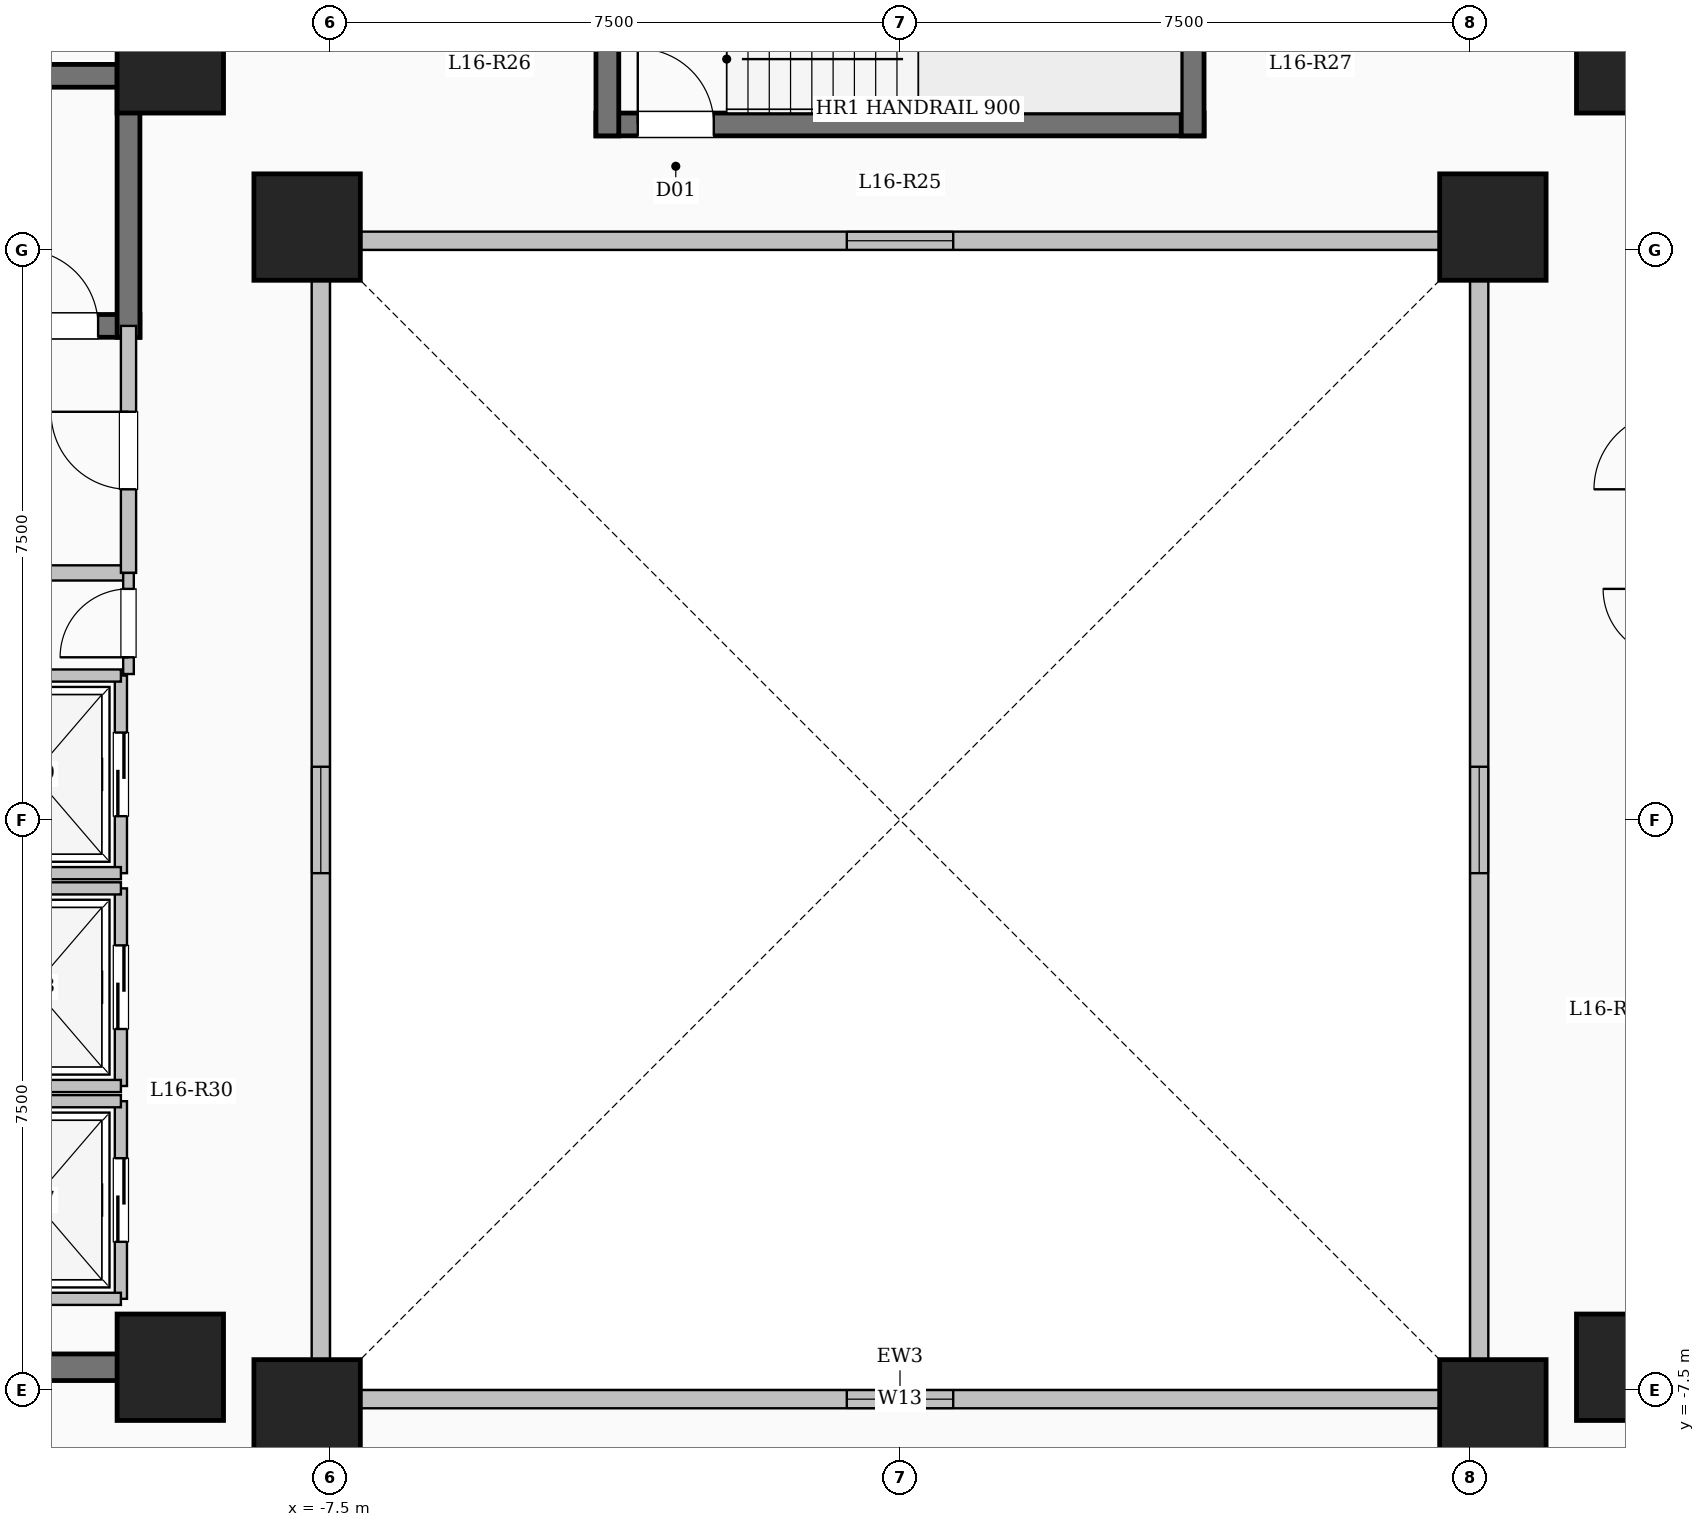
"""IFC4 building model, lengths in metres.
Left out: names, types, materials, properties, quantities, classifications, styles, units other than length and angle.
Written with IfcOpenShell. Run it as: python <this file> out.ifc"""

import sys

from ifc_helpers import new_model, si_unit, direction, frame, frame_2d, origin, origin_2d, place, context, subcontext, project, spatial, rectangle, extrude, element, fill, save


model = new_model("IFC4")
c1 = context("Model", 3, precision=1e-05, world=origin(), true_north=direction((0.0, 1.0)))
c2 = subcontext(c1, "Body", "Model", "MODEL_VIEW")
j1 = project(units=[si_unit("LENGTHUNIT", "METRE"), si_unit("PLANEANGLEUNIT", "RADIAN")], contexts=[c1])
p1 = place(None, origin())
s1 = spatial("IfcSite", under=j1, at=p1, CompositionType="ELEMENT")
p2 = place(p1, origin())
s2 = spatial("IfcBuilding", under=s1, at=p2, CompositionType="ELEMENT")
p3 = place(p2, frame((0.0, 0.0, 60.85)))
s3 = spatial("IfcBuildingStorey", under=s2, at=p3, CompositionType="ELEMENT", Elevation=60.85)
for number, where, z_axis, x_axis in (
    (1, (-7.8, -7.8, 0.0), (0.0, 0.0, 1.0), (1.0, 0.0, 0.0)),
    (2, (7.8, -7.8, 0.0), (0.0, 0.0, 1.0), (1.0, 0.0, 0.0)),
    (3, (-7.8, 7.8, 0.0), (0.0, 0.0, 1.0), (1.0, 0.0, 0.0)),
    (4, (7.8, 7.8, 0.0), (0.0, 0.0, 1.0), (1.0, 0.0, 0.0)),
    (5, (-9.6, -7.2, 0.0), (0.0, 0.0, 1.0), (1.0, 0.0, 0.0)),
    (6, (-9.6, 10.0, 0.0), (0.0, 0.0, 1.0), (1.0, 0.0, 0.0)),
    (7, (9.6, -7.2, 0.0), (0.0, 0.0, 1.0), (1.0, 0.0, 0.0)),
    (8, (9.6, 10.0, 0.0), (0.0, 0.0, 1.0), (1.0, 0.0, 0.0)),
):
    element("IfcColumn", number, at=place(p3, frame(where, z_axis=z_axis, x_axis=x_axis)), inside=s3, PredefinedType="COLUMN", context=c2, shape_type="SweptSolid", body=[
        extrude(rectangle(XDim=1.4, YDim=1.4, at=origin_2d()), origin(), (0.0, 0.0, 1.0), 3.35),
    ])
p4 = place(p3, frame((-7.62, -7.62, 0.0), z_axis=(0.0, 0.0, 1.0), x_axis=(1.0, 0.0, 0.0)))
e9 = element("IfcWall", 9, at=p4, inside=s3, PredefinedType="SOLIDWALL", context=c2, shape_type="SweptSolid", body=[
    extrude(rectangle(XDim=15.24, YDim=0.24, at=frame_2d((7.62, 0.0))), origin(), (0.0, 0.0, 1.0), 3.05),
])
p5 = place(p4, frame((6.92, 0.0, 0.95)))
e10 = element("IfcOpeningElement", 10, at=p5, cuts=e9, PredefinedType="OPENING", context=c2, shape_type="SweptSolid", body=[
    extrude(rectangle(XDim=1.4, YDim=1.5, at=frame_2d((0.7, 0.75))), frame((0.0, 0.13, 0.0), z_axis=(0.0, -1.0, 0.0), x_axis=(1.0, 0.0, 0.0)), (0.0, 0.0, 1.0), 0.26),
])
p6 = place(p3, frame((7.62, -7.62, 0.0), z_axis=(0.0, 0.0, 1.0), x_axis=(0.0, 1.0, 0.0)))
e11 = element("IfcWall", 11, at=p6, inside=s3, PredefinedType="SOLIDWALL", context=c2, shape_type="SweptSolid", body=[
    extrude(rectangle(XDim=15.24, YDim=0.24, at=frame_2d((7.62, 0.0))), origin(), (0.0, 0.0, 1.0), 3.05),
])
p7 = place(p6, frame((6.92, 0.0, 0.95)))
e12 = element("IfcOpeningElement", 12, at=p7, cuts=e11, PredefinedType="OPENING", context=c2, shape_type="SweptSolid", body=[
    extrude(rectangle(XDim=1.4, YDim=1.5, at=frame_2d((0.7, 0.75))), frame((0.0, 0.13, 0.0), z_axis=(0.0, -1.0, 0.0), x_axis=(1.0, 0.0, 0.0)), (0.0, 0.0, 1.0), 0.26),
])
p8 = place(p3, frame((7.62, 7.62, 0.0), z_axis=(0.0, 0.0, 1.0), x_axis=(-1.0, 0.0, 0.0)))
e13 = element("IfcWall", 13, at=p8, inside=s3, PredefinedType="SOLIDWALL", context=c2, shape_type="SweptSolid", body=[
    extrude(rectangle(XDim=15.24, YDim=0.24, at=frame_2d((7.62, 0.0))), origin(), (0.0, 0.0, 1.0), 3.05),
])
p9 = place(p8, frame((6.92, 0.0, 0.95)))
e14 = element("IfcOpeningElement", 14, at=p9, cuts=e13, PredefinedType="OPENING", context=c2, shape_type="SweptSolid", body=[
    extrude(rectangle(XDim=1.4, YDim=1.5, at=frame_2d((0.7, 0.75))), frame((0.0, 0.13, 0.0), z_axis=(0.0, -1.0, 0.0), x_axis=(1.0, 0.0, 0.0)), (0.0, 0.0, 1.0), 0.26),
])
p10 = place(p3, frame((-7.62, 7.62, 0.0), z_axis=(0.0, 0.0, 1.0), x_axis=(0.0, -1.0, 0.0)))
e15 = element("IfcWall", 15, at=p10, inside=s3, PredefinedType="SOLIDWALL", context=c2, shape_type="SweptSolid", body=[
    extrude(rectangle(XDim=15.24, YDim=0.24, at=frame_2d((7.62, 0.0))), origin(), (0.0, 0.0, 1.0), 3.05),
])
p11 = place(p10, frame((6.92, 0.0, 0.95)))
e16 = element("IfcOpeningElement", 16, at=p11, cuts=e15, PredefinedType="OPENING", context=c2, shape_type="SweptSolid", body=[
    extrude(rectangle(XDim=1.4, YDim=1.5, at=frame_2d((0.7, 0.75))), frame((0.0, 0.13, 0.0), z_axis=(0.0, -1.0, 0.0), x_axis=(1.0, 0.0, 0.0)), (0.0, 0.0, 1.0), 0.26),
])
p12 = place(p3, frame((-18.0, 9.79, 0.0), z_axis=(0.0, 0.0, 1.0), x_axis=(1.0, 0.0, 0.0)))
e17 = element("IfcWall", 17, at=p12, inside=s3, PredefinedType="SHEAR", context=c2, shape_type="SweptSolid", body=[
    extrude(rectangle(XDim=8.0, YDim=0.3, at=frame_2d((4.0, 0.0))), origin(), (0.0, 0.0, 1.0), 3.35),
])
p13 = place(p3, frame((-18.0, 6.5, 0.0), z_axis=(0.0, 0.0, 1.0), x_axis=(1.0, 0.0, 0.0)))
e18 = element("IfcWall", 18, at=p13, inside=s3, PredefinedType="SHEAR", context=c2, shape_type="SweptSolid", body=[
    extrude(rectangle(XDim=8.0, YDim=0.3, at=frame_2d((4.0, 0.0))), origin(), (0.0, 0.0, 1.0), 3.35),
])
p14 = place(p13, frame((6.45, 0.0, 0.0)))
e19 = element("IfcOpeningElement", 19, at=p14, cuts=e18, PredefinedType="OPENING", context=c2, shape_type="SweptSolid", body=[
    extrude(rectangle(XDim=1.0, YDim=2.15, at=frame_2d((0.5, 1.075))), frame((0.0, 0.16, 0.0), z_axis=(0.0, -1.0, 0.0), x_axis=(1.0, 0.0, 0.0)), (0.0, 0.0, 1.0), 0.32),
])
p15 = place(p3, frame((-10.15, 6.35, 0.0), z_axis=(0.0, 0.0, 1.0), x_axis=(0.0, 1.0, 0.0)))
e20 = element("IfcWall", 20, at=p15, inside=s3, PredefinedType="SHEAR", context=c2, shape_type="SweptSolid", body=[
    extrude(rectangle(XDim=3.59, YDim=0.3, at=frame_2d((1.795, 0.0))), origin(), (0.0, 0.0, 1.0), 3.35),
])
p16 = place(p3, frame((-4.0, 9.15, 0.0), z_axis=(0.0, 0.0, 1.0), x_axis=(1.0, 0.0, 0.0)))
e21 = element("IfcWall", 21, at=p16, inside=s3, PredefinedType="SHEAR", context=c2, shape_type="SweptSolid", body=[
    extrude(rectangle(XDim=8.0, YDim=0.3, at=frame_2d((4.0, 0.0))), origin(), (0.0, 0.0, 1.0), 3.35),
])
p17 = place(p16, frame((0.55, 0.0, 0.0)))
e22 = element("IfcOpeningElement", 22, at=p17, cuts=e21, PredefinedType="OPENING", context=c2, shape_type="SweptSolid", body=[
    extrude(rectangle(XDim=1.0, YDim=2.15, at=frame_2d((0.5, 1.075))), frame((0.0, 0.16, 0.0), z_axis=(0.0, -1.0, 0.0), x_axis=(1.0, 0.0, 0.0)), (0.0, 0.0, 1.0), 0.32),
])
for number, where, z_axis, x_axis in (
    (23, (-3.85, 9.0, 0.0), (0.0, 0.0, 1.0), (0.0, 1.0, 0.0)),
    (24, (3.85, 9.0, 0.0), (0.0, 0.0, 1.0), (0.0, 1.0, 0.0)),
):
    element("IfcWall", number, at=place(p3, frame(where, z_axis=z_axis, x_axis=x_axis)), inside=s3, PredefinedType="SHEAR", context=c2, shape_type="SweptSolid", body=[
        extrude(rectangle(XDim=3.59, YDim=0.3, at=frame_2d((1.795, 0.0))), origin(), (0.0, 0.0, 1.0), 3.35),
    ])
p18 = place(p3, frame((-15.55, 3.25, 0.0), z_axis=(0.0, 0.0, 1.0), x_axis=(1.0, 0.0, 0.0)))
e25 = element("IfcWall", 25, at=p18, inside=s3, PredefinedType="SOLIDWALL", context=c2, shape_type="SweptSolid", body=[
    extrude(rectangle(XDim=5.4, YDim=0.2, at=frame_2d((2.7, 0.0))), origin(), (0.0, 0.0, 1.0), 3.05),
])
p19 = place(p3, frame((-10.15, 3.25, 0.0), z_axis=(0.0, 0.0, 1.0), x_axis=(0.0, 1.0, 0.0)))
e26 = element("IfcWall", 26, at=p19, inside=s3, PredefinedType="SOLIDWALL", context=c2, shape_type="SweptSolid", body=[
    extrude(rectangle(XDim=3.25, YDim=0.2, at=frame_2d((1.625, 0.0))), origin(), (0.0, 0.0, 1.0), 3.05),
])
p20 = place(p19, frame((1.1, 0.0, 0.0)))
e27 = element("IfcOpeningElement", 27, at=p20, cuts=e26, PredefinedType="OPENING", context=c2, shape_type="SweptSolid", body=[
    extrude(rectangle(XDim=1.02, YDim=2.15, at=frame_2d((0.51, 1.075))), frame((0.0, 0.11, 0.0), z_axis=(0.0, -1.0, 0.0), x_axis=(1.0, 0.0, 0.0)), (0.0, 0.0, 1.0), 0.22),
])
p21 = place(p3, frame((-10.25, -6.3, 0.0), z_axis=(0.0, 0.0, 1.0), x_axis=(0.0, 1.0, 0.0)))
e28 = element("IfcWall", 28, at=p21, inside=s3, PredefinedType="SOLIDWALL", context=c2, shape_type="SweptSolid", body=[
    extrude(rectangle(XDim=2.6, YDim=0.16, at=frame_2d((1.3, 0.0))), origin(), (0.0, 0.0, 1.0), 3.05),
])
p22 = place(p21, frame((0.75, 0.0, 0.0)))
e29 = element("IfcOpeningElement", 29, at=p22, cuts=e28, PredefinedType="OPENING", context=c2, shape_type="SweptSolid", body=[
    extrude(rectangle(XDim=1.1, YDim=2.15, at=frame_2d((0.55, 1.075))), frame((0.0, 0.09, 0.0), z_axis=(0.0, -1.0, 0.0), x_axis=(1.0, 0.0, 0.0)), (0.0, 0.0, 1.0), 0.18),
])
for number, where, z_axis, x_axis in (
    (30, (-12.55, -6.3, 0.0), (0.0, 0.0, 1.0), (1.0, 0.0, 0.0)),
    (31, (-12.55, -3.7, 0.0), (0.0, 0.0, 1.0), (1.0, 0.0, 0.0)),
):
    element("IfcWall", number, at=place(p3, frame(where, z_axis=z_axis, x_axis=x_axis)), inside=s3, PredefinedType="SOLIDWALL", context=c2, shape_type="SweptSolid", body=[
        extrude(rectangle(XDim=2.3, YDim=0.16, at=frame_2d((1.15, 0.0))), origin(), (0.0, 0.0, 1.0), 3.05),
    ])
p23 = place(p3, frame((-10.25, -3.5, 0.0), z_axis=(0.0, 0.0, 1.0), x_axis=(0.0, 1.0, 0.0)))
e32 = element("IfcWall", 32, at=p23, inside=s3, PredefinedType="SOLIDWALL", context=c2, shape_type="SweptSolid", body=[
    extrude(rectangle(XDim=2.6, YDim=0.16, at=frame_2d((1.3, 0.0))), origin(), (0.0, 0.0, 1.0), 3.05),
])
p24 = place(p23, frame((0.75, 0.0, 0.0)))
e33 = element("IfcOpeningElement", 33, at=p24, cuts=e32, PredefinedType="OPENING", context=c2, shape_type="SweptSolid", body=[
    extrude(rectangle(XDim=1.1, YDim=2.15, at=frame_2d((0.55, 1.075))), frame((0.0, 0.09, 0.0), z_axis=(0.0, -1.0, 0.0), x_axis=(1.0, 0.0, 0.0)), (0.0, 0.0, 1.0), 0.18),
])
for number, where, z_axis, x_axis in (
    (34, (-12.55, -3.5, 0.0), (0.0, 0.0, 1.0), (1.0, 0.0, 0.0)),
    (35, (-12.55, -0.9, 0.0), (0.0, 0.0, 1.0), (1.0, 0.0, 0.0)),
):
    element("IfcWall", number, at=place(p3, frame(where, z_axis=z_axis, x_axis=x_axis)), inside=s3, PredefinedType="SOLIDWALL", context=c2, shape_type="SweptSolid", body=[
        extrude(rectangle(XDim=2.3, YDim=0.16, at=frame_2d((1.15, 0.0))), origin(), (0.0, 0.0, 1.0), 3.05),
    ])
p25 = place(p3, frame((-10.25, -0.7, 0.0), z_axis=(0.0, 0.0, 1.0), x_axis=(0.0, 1.0, 0.0)))
e36 = element("IfcWall", 36, at=p25, inside=s3, PredefinedType="SOLIDWALL", context=c2, shape_type="SweptSolid", body=[
    extrude(rectangle(XDim=2.6, YDim=0.16, at=frame_2d((1.3, 0.0))), origin(), (0.0, 0.0, 1.0), 3.05),
])
p26 = place(p25, frame((0.75, 0.0, 0.0)))
e37 = element("IfcOpeningElement", 37, at=p26, cuts=e36, PredefinedType="OPENING", context=c2, shape_type="SweptSolid", body=[
    extrude(rectangle(XDim=1.1, YDim=2.15, at=frame_2d((0.55, 1.075))), frame((0.0, 0.09, 0.0), z_axis=(0.0, -1.0, 0.0), x_axis=(1.0, 0.0, 0.0)), (0.0, 0.0, 1.0), 0.18),
])
for number, where, z_axis, x_axis in (
    (38, (-12.55, -0.7, 0.0), (0.0, 0.0, 1.0), (1.0, 0.0, 0.0)),
    (39, (-12.55, 1.9, 0.0), (0.0, 0.0, 1.0), (1.0, 0.0, 0.0)),
):
    element("IfcWall", number, at=place(p3, frame(where, z_axis=z_axis, x_axis=x_axis)), inside=s3, PredefinedType="SOLIDWALL", context=c2, shape_type="SweptSolid", body=[
        extrude(rectangle(XDim=2.3, YDim=0.16, at=frame_2d((1.15, 0.0))), origin(), (0.0, 0.0, 1.0), 3.05),
    ])
p27 = place(p3, frame((-18.625, -7.2, 0.0), z_axis=(0.0, 0.0, 1.0), x_axis=(1.0, 0.0, 0.0)))
e40 = element("IfcWall", 40, at=p27, inside=s3, PredefinedType="SHEAR", context=c2, shape_type="SweptSolid", body=[
    extrude(rectangle(XDim=8.55, YDim=0.35, at=frame_2d((4.275, 0.0))), origin(), (0.0, 0.0, 1.0), 3.35),
])
p28 = place(p3, frame((-10.15, 1.92, 0.0), z_axis=(0.0, 0.0, 1.0), x_axis=(0.0, 1.0, 0.0)))
e41 = element("IfcWall", 41, at=p28, inside=s3, PredefinedType="PARTITIONING", context=c2, shape_type="SweptSolid", body=[
    extrude(rectangle(XDim=1.33, YDim=0.14, at=frame_2d((0.665, 0.0))), origin(), (0.0, 0.0, 1.0), 3.05),
])
p29 = place(p28, frame((0.22, 0.0, 0.0)))
e42 = element("IfcOpeningElement", 42, at=p29, cuts=e41, PredefinedType="OPENING", context=c2, shape_type="SweptSolid", body=[
    extrude(rectangle(XDim=0.9, YDim=2.08, at=frame_2d((0.45, 1.04))), frame((0.0, 0.08, 0.0), z_axis=(0.0, -1.0, 0.0), x_axis=(1.0, 0.0, 0.0)), (0.0, 0.0, 1.0), 0.16),
])
p30 = place(p5, origin())
e43 = element("IfcWindow", 43, at=p30, inside=s3, PartitioningType="SINGLE_PANEL", PredefinedType="WINDOW", context=c2, shape_type="SweptSolid", body=[
    extrude(rectangle(XDim=1.4, YDim=1.5, at=frame_2d((0.7, 0.75))), frame((0.0, 0.03, 0.0), z_axis=(0.0, -1.0, 0.0), x_axis=(1.0, 0.0, 0.0)), (0.0, 0.0, 1.0), 0.06),
])
fill(e10, e43)
p31 = place(p7, origin())
e44 = element("IfcWindow", 44, at=p31, inside=s3, PartitioningType="SINGLE_PANEL", PredefinedType="WINDOW", context=c2, shape_type="SweptSolid", body=[
    extrude(rectangle(XDim=1.4, YDim=1.5, at=frame_2d((0.7, 0.75))), frame((0.0, 0.03, 0.0), z_axis=(0.0, -1.0, 0.0), x_axis=(1.0, 0.0, 0.0)), (0.0, 0.0, 1.0), 0.06),
])
fill(e12, e44)
p32 = place(p9, origin())
e45 = element("IfcWindow", 45, at=p32, inside=s3, PartitioningType="SINGLE_PANEL", PredefinedType="WINDOW", context=c2, shape_type="SweptSolid", body=[
    extrude(rectangle(XDim=1.4, YDim=1.5, at=frame_2d((0.7, 0.75))), frame((0.0, 0.03, 0.0), z_axis=(0.0, -1.0, 0.0), x_axis=(1.0, 0.0, 0.0)), (0.0, 0.0, 1.0), 0.06),
])
fill(e14, e45)
p33 = place(p11, origin())
e46 = element("IfcWindow", 46, at=p33, inside=s3, PartitioningType="SINGLE_PANEL", PredefinedType="WINDOW", context=c2, shape_type="SweptSolid", body=[
    extrude(rectangle(XDim=1.4, YDim=1.5, at=frame_2d((0.7, 0.75))), frame((0.0, 0.03, 0.0), z_axis=(0.0, -1.0, 0.0), x_axis=(1.0, 0.0, 0.0)), (0.0, 0.0, 1.0), 0.06),
])
fill(e16, e46)
p34 = place(p14, origin())
e47 = element("IfcDoor", 47, at=p34, inside=s3, OperationType="SINGLE_SWING_LEFT", PredefinedType="DOOR", context=c2, shape_type="SweptSolid", body=[
    extrude(rectangle(XDim=1.0, YDim=2.15, at=frame_2d((0.5, 1.075))), frame((0.0, 0.025, 0.0), z_axis=(0.0, -1.0, 0.0), x_axis=(1.0, 0.0, 0.0)), (0.0, 0.0, 1.0), 0.05),
])
fill(e19, e47)
p35 = place(p17, origin())
e48 = element("IfcDoor", 48, at=p35, inside=s3, OperationType="SINGLE_SWING_LEFT", PredefinedType="DOOR", context=c2, shape_type="SweptSolid", body=[
    extrude(rectangle(XDim=1.0, YDim=2.15, at=frame_2d((0.5, 1.075))), frame((0.0, 0.025, 0.0), z_axis=(0.0, -1.0, 0.0), x_axis=(1.0, 0.0, 0.0)), (0.0, 0.0, 1.0), 0.05),
])
fill(e22, e48)
p36 = place(p20, origin())
e49 = element("IfcDoor", 49, at=p36, inside=s3, OperationType="SINGLE_SWING_RIGHT", PredefinedType="DOOR", context=c2, shape_type="SweptSolid", body=[
    extrude(rectangle(XDim=1.02, YDim=2.15, at=frame_2d((0.51, 1.075))), frame((0.0, 0.025, 0.0), z_axis=(0.0, -1.0, 0.0), x_axis=(1.0, 0.0, 0.0)), (0.0, 0.0, 1.0), 0.05),
])
fill(e27, e49)
p37 = place(p22, origin())
e50 = element("IfcDoor", 50, at=p37, inside=s3, OperationType="SLIDING_TO_LEFT", PredefinedType="DOOR", context=c2, shape_type="SweptSolid", body=[
    extrude(rectangle(XDim=1.1, YDim=2.15, at=frame_2d((0.55, 1.075))), frame((0.0, 0.025, 0.0), z_axis=(0.0, -1.0, 0.0), x_axis=(1.0, 0.0, 0.0)), (0.0, 0.0, 1.0), 0.05),
])
fill(e29, e50)
p38 = place(p24, origin())
e51 = element("IfcDoor", 51, at=p38, inside=s3, OperationType="SLIDING_TO_LEFT", PredefinedType="DOOR", context=c2, shape_type="SweptSolid", body=[
    extrude(rectangle(XDim=1.1, YDim=2.15, at=frame_2d((0.55, 1.075))), frame((0.0, 0.025, 0.0), z_axis=(0.0, -1.0, 0.0), x_axis=(1.0, 0.0, 0.0)), (0.0, 0.0, 1.0), 0.05),
])
fill(e33, e51)
p39 = place(p26, origin())
e52 = element("IfcDoor", 52, at=p39, inside=s3, OperationType="SLIDING_TO_LEFT", PredefinedType="DOOR", context=c2, shape_type="SweptSolid", body=[
    extrude(rectangle(XDim=1.1, YDim=2.15, at=frame_2d((0.55, 1.075))), frame((0.0, 0.025, 0.0), z_axis=(0.0, -1.0, 0.0), x_axis=(1.0, 0.0, 0.0)), (0.0, 0.0, 1.0), 0.05),
])
fill(e37, e52)
p40 = place(p29, origin())
e53 = element("IfcDoor", 53, at=p40, inside=s3, OperationType="SINGLE_SWING_LEFT", PredefinedType="DOOR", context=c2, shape_type="SweptSolid", body=[
    extrude(rectangle(XDim=0.9, YDim=2.08, at=frame_2d((0.45, 1.04))), frame((0.0, 0.025, 0.0), z_axis=(0.0, -1.0, 0.0), x_axis=(1.0, 0.0, 0.0)), (0.0, 0.0, 1.0), 0.05),
])
fill(e42, e53)
save(model, sys.argv[1])
